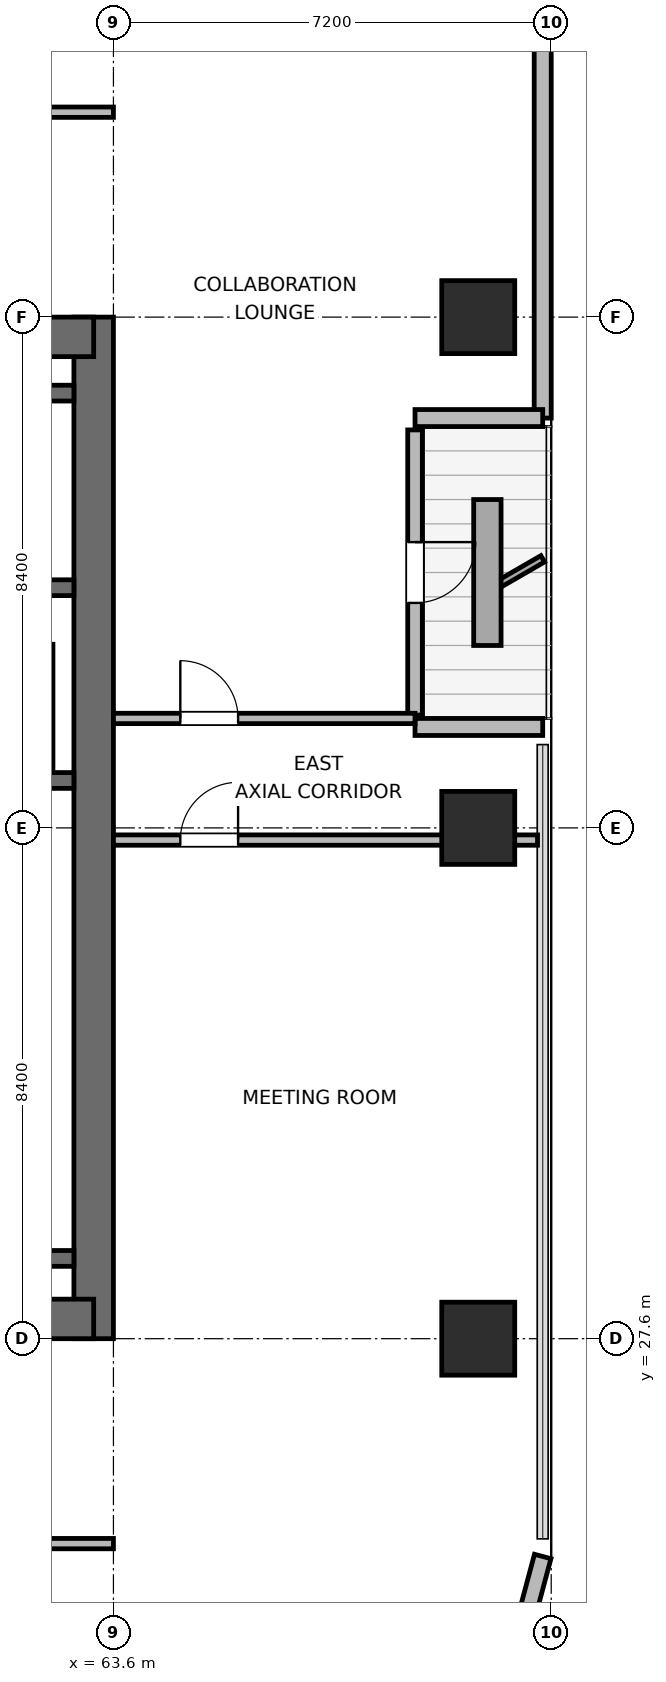
"""IFC4 building model, lengths in metres.
Left out: names, types, materials, properties, quantities, classifications, styles, units other than length and angle.
Written with IfcOpenShell. Run it as: python <this file> out.ifc"""

import sys

from ifc_helpers import new_model, si_unit, direction, frame, frame_2d, origin, origin_2d, place, context, subcontext, project, spatial, rectangle, extrude, element, fill, save


model = new_model("IFC4")
c1 = context("Model", 3, precision=1e-05, world=origin(), true_north=direction((0.0, 1.0)))
c2 = subcontext(c1, "Body", "Model", "MODEL_VIEW")
j1 = project(units=[si_unit("LENGTHUNIT", "METRE"), si_unit("PLANEANGLEUNIT", "RADIAN")], contexts=[c1])
p1 = place(None, origin())
s1 = spatial("IfcSite", under=j1, at=p1, CompositionType="ELEMENT")
p2 = place(p1, origin())
s2 = spatial("IfcBuilding", under=s1, at=p2, CompositionType="ELEMENT")
p3 = place(p2, frame((0.0, 0.0, 190.2)))
s3 = spatial("IfcBuildingStorey", under=s2, at=p3, CompositionType="ELEMENT", Elevation=190.2)
p4 = place(p3, frame((63.275, 27.6, 0.0), z_axis=(0.0, 0.0, 1.0), x_axis=(0.0, 1.0, 0.0)))
e1 = element("IfcWall", 1, at=p4, inside=s3, PredefinedType="SHEAR", context=c2, shape_type="SweptSolid", body=[
    extrude(rectangle(XDim=16.8, YDim=0.65, at=frame_2d((8.4, 0.0))), origin(), (0.0, 0.0, 1.0), 3.9),
])
p5 = place(p3, frame((53.925, 27.925, 0.0), z_axis=(0.0, 0.0, 1.0), x_axis=(1.0, 0.0, 0.0)))
e2 = element("IfcWall", 2, at=p5, inside=s3, PredefinedType="SHEAR", context=c2, shape_type="SweptSolid", body=[
    extrude(rectangle(XDim=9.35, YDim=0.65, at=frame_2d((4.675, 0.0))), origin(), (0.0, 0.0, 1.0), 3.9),
])
p6 = place(p5, frame((3.975, 0.0, 0.0)))
e3 = element("IfcOpeningElement", 3, at=p6, cuts=e2, PredefinedType="OPENING", context=c2, shape_type="SweptSolid", body=[
    extrude(rectangle(XDim=1.05, YDim=2.04, at=frame_2d((0.525, 1.02))), frame((0.0, 0.335, 0.0), z_axis=(0.0, -1.0, 0.0), x_axis=(1.0, 0.0, 0.0)), (0.0, 0.0, 1.0), 0.67),
])
p7 = place(p3, frame((53.925, 44.075, 0.0), z_axis=(0.0, 0.0, 1.0), x_axis=(1.0, 0.0, 0.0)))
e4 = element("IfcWall", 4, at=p7, inside=s3, PredefinedType="SHEAR", context=c2, shape_type="SweptSolid", body=[
    extrude(rectangle(XDim=9.35, YDim=0.65, at=frame_2d((4.675, 0.0))), origin(), (0.0, 0.0, 1.0), 3.9),
])
for number, where, z_axis, x_axis in (
    (5, (58.89, 28.92, 0.0), (0.0, 0.0, 1.0), (1.0, 0.0, 0.0)),
    (6, (58.89, 36.78, 0.0), (0.0, 0.0, 1.0), (1.0, 0.0, 0.0)),
):
    element("IfcWall", number, at=place(p3, frame(where, z_axis=z_axis, x_axis=x_axis)), inside=s3, PredefinedType="SHEAR", context=c2, shape_type="SweptSolid", body=[
        extrude(rectangle(XDim=4.06, YDim=0.26, at=frame_2d((2.03, 0.0))), origin(), (0.0, 0.0, 1.0), 3.9),
    ])
p8 = place(p3, frame((54.25, 39.95, 0.0), z_axis=(0.0, 0.0, 1.0), x_axis=(1.0, 0.0, 0.0)))
e7 = element("IfcWall", 7, at=p8, inside=s3, PredefinedType="SHEAR", context=c2, shape_type="SweptSolid", body=[
    extrude(rectangle(XDim=8.7, YDim=0.26, at=frame_2d((4.35, 0.0))), origin(), (0.0, 0.0, 1.0), 3.9),
])
p9 = place(p8, frame((0.95, 0.0, 0.0)))
e8 = element("IfcOpeningElement", 8, at=p9, cuts=e7, PredefinedType="OPENING", context=c2, shape_type="SweptSolid", body=[
    extrude(rectangle(XDim=1.0, YDim=2.04, at=frame_2d((0.5, 1.02))), frame((0.0, 0.14, 0.0), z_axis=(0.0, -1.0, 0.0), x_axis=(1.0, 0.0, 0.0)), (0.0, 0.0, 1.0), 0.28),
])
p10 = place(p3, frame((54.25, 43.15, 0.0), z_axis=(0.0, 0.0, 1.0), x_axis=(1.0, 0.0, 0.0)))
e9 = element("IfcWall", 9, at=p10, inside=s3, PredefinedType="SHEAR", context=c2, shape_type="SweptSolid", body=[
    extrude(rectangle(XDim=8.7, YDim=0.26, at=frame_2d((4.35, 0.0))), origin(), (0.0, 0.0, 1.0), 3.9),
])
for number, where, z_axis, x_axis in (
    (10, (69.6, 27.6, 0.0), (0.0, 0.0, 1.0), (1.0, 0.0, 0.0)),
    (11, (69.6, 36.0, 0.0), (0.0, 0.0, 1.0), (1.0, 0.0, 0.0)),
    (12, (69.6, 44.4, 0.0), (0.0, 0.0, 1.0), (1.0, 0.0, 0.0)),
):
    element("IfcColumn", number, at=place(p3, frame(where, z_axis=z_axis, x_axis=x_axis)), inside=s3, PredefinedType="COLUMN", context=c2, shape_type="SweptSolid", body=[
        extrude(rectangle(XDim=1.2, YDim=1.2, at=origin_2d()), origin(), (0.0, 0.0, 1.0), 3.9),
    ])
p11 = place(p3, frame((70.66, 56.982, 0.0), z_axis=(0.0, 0.0, 1.0), x_axis=(0.0, -1.0, 0.0)))
e13 = element("IfcWall", 13, at=p11, inside=s3, PredefinedType="SOLIDWALL", context=c2, shape_type="SweptSolid", body=[
    extrude(rectangle(XDim=14.242, YDim=0.28, at=frame_2d((7.121, 0.0))), origin(), (0.0, 0.0, 1.0), 3.68),
])
p12 = place(p3, frame((70.66, 42.74, 0.0), z_axis=(0.0, 0.0, 1.0), x_axis=(-1.0, 0.0, 0.0)))
e14 = element("IfcWall", 14, at=p12, inside=s3, PredefinedType="SOLIDWALL", context=c2, shape_type="SweptSolid", body=[
    extrude(rectangle(XDim=2.1, YDim=0.28, at=frame_2d((1.05, 0.0))), origin(), (0.0, 0.0, 1.0), 3.116),
])
p13 = place(p3, frame((68.56, 42.545, 0.0), z_axis=(0.0, 0.0, 1.0), x_axis=(0.0, -1.0, 0.0)))
e15 = element("IfcWall", 15, at=p13, inside=s3, PredefinedType="SOLIDWALL", context=c2, shape_type="SweptSolid", body=[
    extrude(rectangle(XDim=4.69, YDim=0.24, at=frame_2d((2.345, 0.0))), origin(), (0.0, 0.0, 1.0), 3.248),
])
p14 = place(p13, frame((1.845, 0.0, 0.0)))
e16 = element("IfcOpeningElement", 16, at=p14, cuts=e15, PredefinedType="OPENING", context=c2, shape_type="SweptSolid", body=[
    extrude(rectangle(XDim=1.0, YDim=2.02, at=frame_2d((0.5, 1.01))), frame((0.0, 0.13, 0.0), z_axis=(0.0, -1.0, 0.0), x_axis=(1.0, 0.0, 0.0)), (0.0, 0.0, 1.0), 0.26),
])
p15 = place(p3, frame((68.56, 37.66, 0.0), z_axis=(0.0, 0.0, 1.0), x_axis=(1.0, 0.0, 0.0)))
e17 = element("IfcWall", 17, at=p15, inside=s3, PredefinedType="SOLIDWALL", context=c2, shape_type="SweptSolid", body=[
    extrude(rectangle(XDim=2.1, YDim=0.28, at=frame_2d((1.05, 0.0))), origin(), (0.0, 0.0, 1.0), 3.116),
])
p16 = place(p3, frame((70.66, 24.018, 0.0), z_axis=(0.0, 0.0, 1.0), x_axis=(-0.258672222976, -0.9659651552, 0.0)))
e18 = element("IfcWall", 18, at=p16, inside=s3, PredefinedType="SOLIDWALL", context=c2, shape_type="SweptSolid", body=[
    extrude(rectangle(XDim=2.739, YDim=0.28, at=frame_2d((1.37, 0.0))), origin(), (0.0, 0.0, 1.0), 3.68),
])
p17 = place(p3, frame((62.5, 36.98, 0.0), z_axis=(0.0, 0.0, 1.0), x_axis=(0.0, 1.0, 0.0)))
e19 = element("IfcWall", 19, at=p17, inside=s3, PredefinedType="PARTITIONING", context=c2, shape_type="SweptSolid", body=[
    extrude(rectangle(XDim=2.04, YDim=0.21, at=frame_2d((1.02, 0.0))), origin(), (0.0, 0.0, 1.0), 3.68),
])
p18 = place(p3, frame((29.25, 24.23, 0.0), z_axis=(0.0, 0.0, 1.0), x_axis=(1.0, 0.0, 0.0)))
e20 = element("IfcWall", 20, at=p18, inside=s3, PredefinedType="PARTITIONING", context=c2, shape_type="SweptSolid", body=[
    extrude(rectangle(XDim=34.35, YDim=0.17, at=frame_2d((17.175, 0.0))), origin(), (0.0, 0.0, 1.0), 3.68),
])
p19 = place(p18, frame((4.12, 0.0, 0.0)))
e21 = element("IfcOpeningElement", 21, at=p19, cuts=e20, PredefinedType="OPENING", context=c2, shape_type="SweptSolid", body=[
    extrude(rectangle(XDim=0.95, YDim=2.04, at=frame_2d((0.475, 1.02))), frame((0.0, 0.095, 0.0), z_axis=(0.0, -1.0, 0.0), x_axis=(1.0, 0.0, 0.0)), (0.0, 0.0, 1.0), 0.19),
])
p20 = place(p18, frame((12.705, 0.0, 0.0)))
e22 = element("IfcOpeningElement", 22, at=p20, cuts=e20, PredefinedType="OPENING", context=c2, shape_type="SweptSolid", body=[
    extrude(rectangle(XDim=0.95, YDim=2.04, at=frame_2d((0.475, 1.02))), frame((0.0, 0.095, 0.0), z_axis=(0.0, -1.0, 0.0), x_axis=(1.0, 0.0, 0.0)), (0.0, 0.0, 1.0), 0.19),
])
p21 = place(p18, frame((20.69, 0.0, 0.0)))
e23 = element("IfcOpeningElement", 23, at=p21, cuts=e20, PredefinedType="OPENING", context=c2, shape_type="SweptSolid", body=[
    extrude(rectangle(XDim=0.95, YDim=2.04, at=frame_2d((0.475, 1.02))), frame((0.0, 0.095, 0.0), z_axis=(0.0, -1.0, 0.0), x_axis=(1.0, 0.0, 0.0)), (0.0, 0.0, 1.0), 0.19),
])
p22 = place(p18, frame((29.28, 0.0, 0.0)))
e24 = element("IfcOpeningElement", 24, at=p22, cuts=e20, PredefinedType="OPENING", context=c2, shape_type="SweptSolid", body=[
    extrude(rectangle(XDim=0.95, YDim=2.04, at=frame_2d((0.475, 1.02))), frame((0.0, 0.095, 0.0), z_axis=(0.0, -1.0, 0.0), x_axis=(1.0, 0.0, 0.0)), (0.0, 0.0, 1.0), 0.19),
])
p23 = place(p3, frame((29.25, 47.77, 0.0), z_axis=(0.0, 0.0, 1.0), x_axis=(1.0, 0.0, 0.0)))
e25 = element("IfcWall", 25, at=p23, inside=s3, PredefinedType="PARTITIONING", context=c2, shape_type="SweptSolid", body=[
    extrude(rectangle(XDim=34.35, YDim=0.17, at=frame_2d((17.175, 0.0))), origin(), (0.0, 0.0, 1.0), 3.68),
])
p24 = place(p23, frame((5.99, 0.0, 0.0)))
e26 = element("IfcOpeningElement", 26, at=p24, cuts=e25, PredefinedType="OPENING", context=c2, shape_type="SweptSolid", body=[
    extrude(rectangle(XDim=0.95, YDim=2.04, at=frame_2d((0.475, 1.02))), frame((0.0, 0.095, 0.0), z_axis=(0.0, -1.0, 0.0), x_axis=(1.0, 0.0, 0.0)), (0.0, 0.0, 1.0), 0.19),
])
p25 = place(p23, frame((19.635, 0.0, 0.0)))
e27 = element("IfcOpeningElement", 27, at=p25, cuts=e25, PredefinedType="OPENING", context=c2, shape_type="SweptSolid", body=[
    extrude(rectangle(XDim=0.95, YDim=2.04, at=frame_2d((0.475, 1.02))), frame((0.0, 0.095, 0.0), z_axis=(0.0, -1.0, 0.0), x_axis=(1.0, 0.0, 0.0)), (0.0, 0.0, 1.0), 0.19),
])
p26 = place(p23, frame((30.345, 0.0, 0.0)))
e28 = element("IfcOpeningElement", 28, at=p26, cuts=e25, PredefinedType="OPENING", context=c2, shape_type="SweptSolid", body=[
    extrude(rectangle(XDim=0.95, YDim=2.04, at=frame_2d((0.475, 1.02))), frame((0.0, 0.095, 0.0), z_axis=(0.0, -1.0, 0.0), x_axis=(1.0, 0.0, 0.0)), (0.0, 0.0, 1.0), 0.19),
])
p27 = place(p3, frame((63.6, 35.8, 0.0), z_axis=(0.0, 0.0, 1.0), x_axis=(1.0, 0.0, 0.0)))
e29 = element("IfcWall", 29, at=p27, inside=s3, PredefinedType="PARTITIONING", context=c2, shape_type="SweptSolid", body=[
    extrude(rectangle(XDim=6.975, YDim=0.17, at=frame_2d((3.487, 0.0))), origin(), (0.0, 0.0, 1.0), 3.043),
])
p28 = place(p27, frame((1.1, 0.0, 0.0)))
e30 = element("IfcOpeningElement", 30, at=p28, cuts=e29, PredefinedType="OPENING", context=c2, shape_type="SweptSolid", body=[
    extrude(rectangle(XDim=0.95, YDim=2.04, at=frame_2d((0.475, 1.02))), frame((0.0, 0.095, 0.0), z_axis=(0.0, -1.0, 0.0), x_axis=(1.0, 0.0, 0.0)), (0.0, 0.0, 1.0), 0.19),
])
p29 = place(p3, frame((63.6, 37.8, 0.0), z_axis=(0.0, 0.0, 1.0), x_axis=(1.0, 0.0, 0.0)))
e31 = element("IfcWall", 31, at=p29, inside=s3, PredefinedType="PARTITIONING", context=c2, shape_type="SweptSolid", body=[
    extrude(rectangle(XDim=4.96, YDim=0.17, at=frame_2d((2.48, 0.0))), origin(), (0.0, 0.0, 1.0), 3.68),
])
p30 = place(p29, frame((1.1, 0.0, 0.0)))
e32 = element("IfcOpeningElement", 32, at=p30, cuts=e31, PredefinedType="OPENING", context=c2, shape_type="SweptSolid", body=[
    extrude(rectangle(XDim=0.95, YDim=2.04, at=frame_2d((0.475, 1.02))), frame((0.0, 0.095, 0.0), z_axis=(0.0, -1.0, 0.0), x_axis=(1.0, 0.0, 0.0)), (0.0, 0.0, 1.0), 0.19),
])
p31 = place(p14, origin())
e33 = element("IfcDoor", 33, at=p31, inside=s3, OperationType="SINGLE_SWING_LEFT", PredefinedType="DOOR", context=c2, shape_type="SweptSolid", body=[
    extrude(rectangle(XDim=1.0, YDim=2.02, at=frame_2d((0.5, 1.01))), frame((0.0, 0.025, 0.0), z_axis=(0.0, -1.0, 0.0), x_axis=(1.0, 0.0, 0.0)), (0.0, 0.0, 1.0), 0.05),
])
fill(e16, e33)
p32 = place(p28, origin())
e34 = element("IfcDoor", 34, at=p32, inside=s3, OperationType="SINGLE_SWING_RIGHT", PredefinedType="DOOR", context=c2, shape_type="SweptSolid", body=[
    extrude(rectangle(XDim=0.95, YDim=2.04, at=frame_2d((0.475, 1.02))), frame((0.0, 0.025, 0.0), z_axis=(0.0, -1.0, 0.0), x_axis=(1.0, 0.0, 0.0)), (0.0, 0.0, 1.0), 0.05),
])
fill(e30, e34)
p33 = place(p30, origin())
e35 = element("IfcDoor", 35, at=p33, inside=s3, OperationType="SINGLE_SWING_LEFT", PredefinedType="DOOR", context=c2, shape_type="SweptSolid", body=[
    extrude(rectangle(XDim=0.95, YDim=2.04, at=frame_2d((0.475, 1.02))), frame((0.0, 0.025, 0.0), z_axis=(0.0, -1.0, 0.0), x_axis=(1.0, 0.0, 0.0)), (0.0, 0.0, 1.0), 0.05),
])
fill(e32, e35)
save(model, sys.argv[1])
